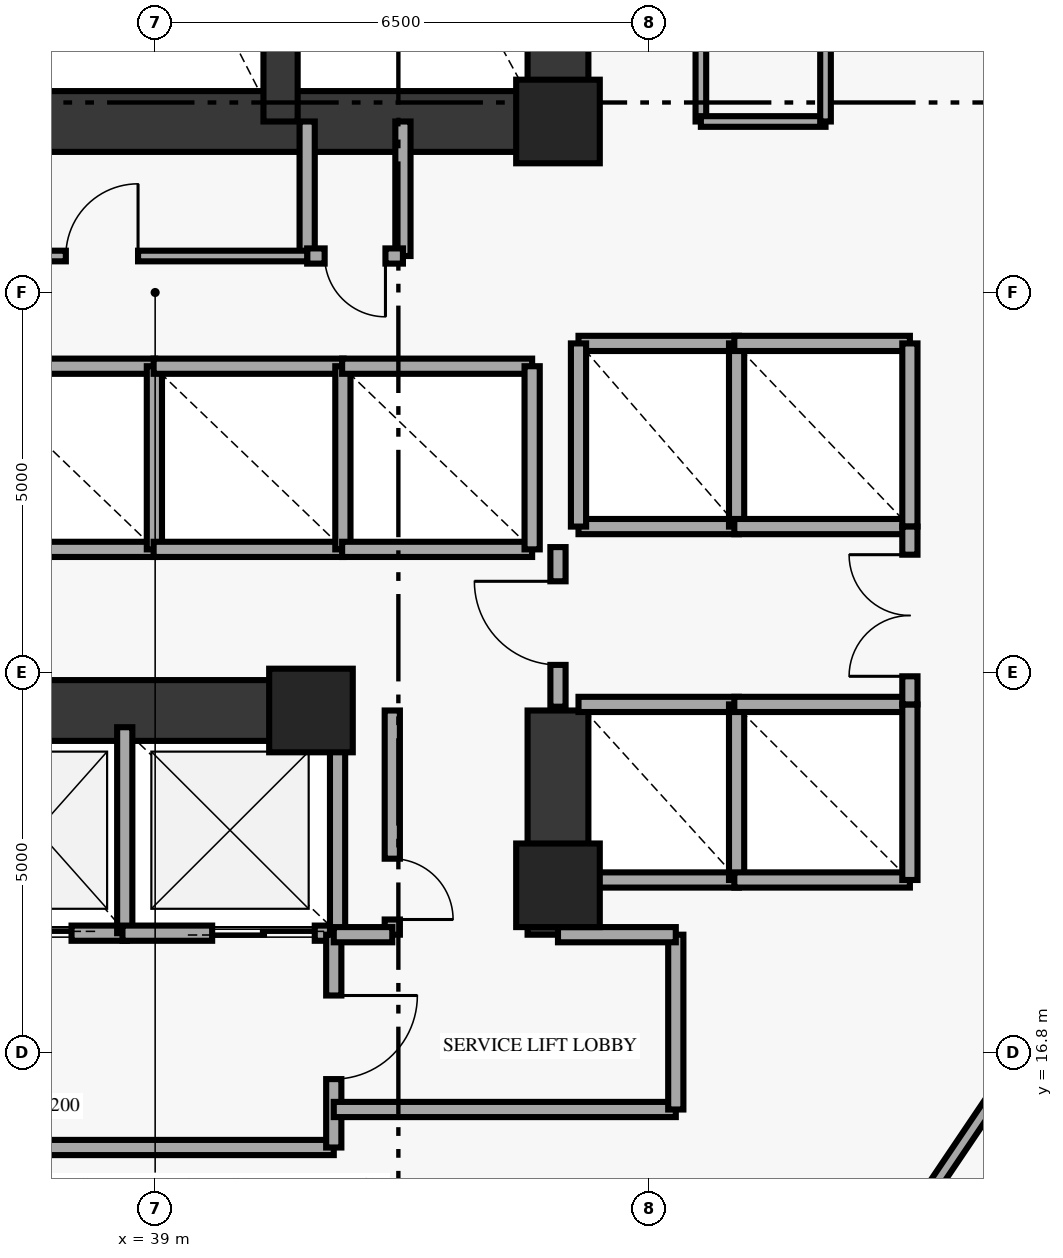
"""IFC4 building model, lengths in metres.
Left out: names, types, materials, properties, quantities, classifications, styles, units other than length and angle.
Written with IfcOpenShell. Run it as: python <this file> out.ifc"""

import sys

from ifc_helpers import new_model, si_unit, direction, frame, frame_2d, origin, origin_2d, place, context, subcontext, project, spatial, rectangle, extrude, element, fill, save


model = new_model("IFC4")
c1 = context("Model", 3, precision=1e-05, world=origin(), true_north=direction((0.0, 1.0)))
c2 = subcontext(c1, "Body", "Model", "MODEL_VIEW")
j1 = project(units=[si_unit("LENGTHUNIT", "METRE"), si_unit("PLANEANGLEUNIT", "RADIAN")], contexts=[c1])
p1 = place(None, origin())
s1 = spatial("IfcSite", under=j1, at=p1, CompositionType="ELEMENT")
p2 = place(p1, origin())
s2 = spatial("IfcBuilding", under=s1, at=p2, CompositionType="ELEMENT")
p3 = place(p2, frame((0.0, 0.0, 53.4)))
s3 = spatial("IfcBuildingStorey", under=s2, at=p3, CompositionType="ELEMENT", Elevation=53.4)
for number, where, z_axis, x_axis in (
    (1, (41.05, 21.3, 0.0), (0.0, 0.0, 1.0), (1.0, 0.0, 0.0)),
    (2, (44.3, 19.0, 0.0), (0.0, 0.0, 1.0), (1.0, 0.0, 0.0)),
    (3, (44.3, 29.05, 0.0), (0.0, 0.0, 1.0), (1.0, 0.0, 0.0)),
):
    element("IfcColumn", number, at=place(p3, frame(where, z_axis=z_axis, x_axis=x_axis)), inside=s3, PredefinedType="PILASTER", context=c2, shape_type="SweptSolid", body=[
        extrude(rectangle(XDim=1.1, YDim=1.1, at=origin_2d()), origin(), (0.0, 0.0, 1.0), 3.8),
    ])
p4 = place(p3, frame((44.3, 29.05, 0.0), z_axis=(0.0, 0.0, 1.0), x_axis=(0.0, 1.0, 0.0)))
e4 = element("IfcWall", 4, at=p4, inside=s3, PredefinedType="SHEAR", context=c2, shape_type="SweptSolid", body=[
    extrude(rectangle(XDim=8.35, YDim=0.8, at=frame_2d((4.175, 0.0))), origin(), (0.0, 0.0, 1.0), 3.8),
])
p5 = place(p3, frame((44.3, 18.35, 0.0), z_axis=(0.0, 0.0, 1.0), x_axis=(0.0, 1.0, 0.0)))
e5 = element("IfcWall", 5, at=p5, inside=s3, PredefinedType="SHEAR", context=c2, shape_type="SweptSolid", body=[
    extrude(rectangle(XDim=2.95, YDim=0.8, at=frame_2d((1.475, 0.0))), origin(), (0.0, 0.0, 1.0), 3.8),
])
p6 = place(p3, frame((33.7, 29.05, 0.0), z_axis=(0.0, 0.0, 1.0), x_axis=(1.0, 0.0, 0.0)))
e6 = element("IfcWall", 6, at=p6, inside=s3, PredefinedType="SHEAR", context=c2, shape_type="SweptSolid", body=[
    extrude(rectangle(XDim=10.6, YDim=0.8, at=frame_2d((5.3, 0.0))), origin(), (0.0, 0.0, 1.0), 3.8),
])
p7 = place(p3, frame((33.7, 21.3, 0.0), z_axis=(0.0, 0.0, 1.0), x_axis=(1.0, 0.0, 0.0)))
e7 = element("IfcWall", 7, at=p7, inside=s3, PredefinedType="SHEAR", context=c2, shape_type="SweptSolid", body=[
    extrude(rectangle(XDim=7.55, YDim=0.8, at=frame_2d((3.775, 0.0))), origin(), (0.0, 0.0, 1.0), 3.8),
])
p8 = place(p3, frame((40.65, 29.05, 0.0), z_axis=(0.0, 0.0, 1.0), x_axis=(0.0, 1.0, 0.0)))
e8 = element("IfcWall", 8, at=p8, inside=s3, PredefinedType="SHEAR", context=c2, shape_type="SweptSolid", body=[
    extrude(rectangle(XDim=8.35, YDim=0.45, at=frame_2d((4.175, 0.0))), origin(), (0.0, 0.0, 1.0), 3.8),
])
for number, where, z_axis, x_axis in (
    (9, (41.0, 27.28, 0.0), (0.0, 0.0, 1.0), (0.0, 1.0, 0.0)),
    (10, (42.26, 27.28, 0.0), (0.0, 0.0, 1.0), (0.0, 1.0, 0.0)),
):
    element("IfcWall", number, at=place(p3, frame(where, z_axis=z_axis, x_axis=x_axis)), inside=s3, PredefinedType="SOLIDWALL", context=c2, shape_type="SweptSolid", body=[
        extrude(rectangle(XDim=1.77, YDim=0.2, at=frame_2d((0.885, 0.0))), origin(), (0.0, 0.0, 1.0), 3.8),
    ])
p9 = place(p3, frame((41.0, 27.28, 0.0), z_axis=(0.0, 0.0, 1.0), x_axis=(1.0, 0.0, 0.0)))
e11 = element("IfcWall", 11, at=p9, inside=s3, PredefinedType="SOLIDWALL", context=c2, shape_type="SweptSolid", body=[
    extrude(rectangle(XDim=1.26, YDim=0.2, at=frame_2d((0.63, 0.0))), origin(), (0.0, 0.0, 1.0), 3.8),
])
p10 = place(p9, frame((0.23, 0.0, 0.0)))
e12 = element("IfcOpeningElement", 12, at=p10, cuts=e11, PredefinedType="OPENING", context=c2, shape_type="SweptSolid", body=[
    extrude(rectangle(XDim=0.8, YDim=2.05, at=frame_2d((0.4, 1.025))), frame((0.0, 0.11, 0.0), z_axis=(0.0, -1.0, 0.0), x_axis=(1.0, 0.0, 0.0)), (0.0, 0.0, 1.0), 0.22),
])
for number, where, z_axis, x_axis in (
    (13, (44.57, 23.72, 0.0), (0.0, 0.0, 1.0), (1.0, 0.0, 0.0)),
    (14, (44.57, 26.13, 0.0), (0.0, 0.0, 1.0), (1.0, 0.0, 0.0)),
):
    element("IfcWall", number, at=place(p3, frame(where, z_axis=z_axis, x_axis=x_axis)), inside=s3, PredefinedType="SOLIDWALL", context=c2, shape_type="SweptSolid", body=[
        extrude(rectangle(XDim=2.11, YDim=0.2, at=frame_2d((1.055, 0.0))), origin(), (0.0, 0.0, 1.0), 3.8),
    ])
for number, where, z_axis, x_axis in (
    (15, (44.57, 23.72, 0.0), (0.0, 0.0, 1.0), (0.0, 1.0, 0.0)),
    (16, (46.65, 23.72, 0.0), (0.0, 0.0, 1.0), (0.0, 1.0, 0.0)),
):
    element("IfcWall", number, at=place(p3, frame(where, z_axis=z_axis, x_axis=x_axis)), inside=s3, PredefinedType="SOLIDWALL", context=c2, shape_type="SweptSolid", body=[
        extrude(rectangle(XDim=2.41, YDim=0.2, at=frame_2d((1.205, 0.0))), origin(), (0.0, 0.0, 1.0), 3.8),
    ])
for number, where, z_axis, x_axis in (
    (17, (46.62, 23.72, 0.0), (0.0, 0.0, 1.0), (1.0, 0.0, 0.0)),
    (18, (46.62, 26.13, 0.0), (0.0, 0.0, 1.0), (1.0, 0.0, 0.0)),
):
    element("IfcWall", number, at=place(p3, frame(where, z_axis=z_axis, x_axis=x_axis)), inside=s3, PredefinedType="SOLIDWALL", context=c2, shape_type="SweptSolid", body=[
        extrude(rectangle(XDim=2.31, YDim=0.2, at=frame_2d((1.155, 0.0))), origin(), (0.0, 0.0, 1.0), 3.8),
    ])
p11 = place(p3, frame((48.93, 23.72, 0.0), z_axis=(0.0, 0.0, 1.0), x_axis=(0.0, 1.0, 0.0)))
e19 = element("IfcWall", 19, at=p11, inside=s3, PredefinedType="SOLIDWALL", context=c2, shape_type="SweptSolid", body=[
    extrude(rectangle(XDim=2.41, YDim=0.2, at=frame_2d((1.205, 0.0))), origin(), (0.0, 0.0, 1.0), 3.8),
])
for number, where, z_axis, x_axis in (
    (20, (44.57, 19.07, 0.0), (0.0, 0.0, 1.0), (1.0, 0.0, 0.0)),
    (21, (44.57, 21.38, 0.0), (0.0, 0.0, 1.0), (1.0, 0.0, 0.0)),
):
    element("IfcWall", number, at=place(p3, frame(where, z_axis=z_axis, x_axis=x_axis)), inside=s3, PredefinedType="SOLIDWALL", context=c2, shape_type="SweptSolid", body=[
        extrude(rectangle(XDim=2.11, YDim=0.2, at=frame_2d((1.055, 0.0))), origin(), (0.0, 0.0, 1.0), 3.8),
    ])
for number, where, z_axis, x_axis in (
    (22, (46.65, 19.07, 0.0), (0.0, 0.0, 1.0), (0.0, 1.0, 0.0)),
    (23, (46.62, 19.07, 0.0), (0.0, 0.0, 1.0), (1.0, 0.0, 0.0)),
    (24, (46.62, 21.38, 0.0), (0.0, 0.0, 1.0), (1.0, 0.0, 0.0)),
    (25, (48.93, 19.07, 0.0), (0.0, 0.0, 1.0), (0.0, 1.0, 0.0)),
):
    element("IfcWall", number, at=place(p3, frame(where, z_axis=z_axis, x_axis=x_axis)), inside=s3, PredefinedType="SOLIDWALL", context=c2, shape_type="SweptSolid", body=[
        extrude(rectangle(XDim=2.31, YDim=0.2, at=frame_2d((1.155, 0.0))), origin(), (0.0, 0.0, 1.0), 3.8),
    ])
for number, where, z_axis, x_axis in (
    (26, (36.5, 23.42, 0.0), (0.0, 0.0, 1.0), (1.0, 0.0, 0.0)),
    (27, (36.5, 25.83, 0.0), (0.0, 0.0, 1.0), (1.0, 0.0, 0.0)),
):
    element("IfcWall", number, at=place(p3, frame(where, z_axis=z_axis, x_axis=x_axis)), inside=s3, PredefinedType="SOLIDWALL", context=c2, shape_type="SweptSolid", body=[
        extrude(rectangle(XDim=2.5, YDim=0.2, at=frame_2d((1.25, 0.0))), origin(), (0.0, 0.0, 1.0), 3.8),
    ])
p12 = place(p3, frame((38.99, 23.42, 0.0), z_axis=(0.0, 0.0, 1.0), x_axis=(0.0, 1.0, 0.0)))
e28 = element("IfcWall", 28, at=p12, inside=s3, PredefinedType="SOLIDWALL", context=c2, shape_type="SweptSolid", body=[
    extrude(rectangle(XDim=2.41, YDim=0.2, at=frame_2d((1.205, 0.0))), origin(), (0.0, 0.0, 1.0), 3.8),
])
for number, where, z_axis, x_axis in (
    (29, (38.98, 23.42, 0.0), (0.0, 0.0, 1.0), (1.0, 0.0, 0.0)),
    (30, (38.98, 25.83, 0.0), (0.0, 0.0, 1.0), (1.0, 0.0, 0.0)),
):
    element("IfcWall", number, at=place(p3, frame(where, z_axis=z_axis, x_axis=x_axis)), inside=s3, PredefinedType="SOLIDWALL", context=c2, shape_type="SweptSolid", body=[
        extrude(rectangle(XDim=2.5, YDim=0.2, at=frame_2d((1.25, 0.0))), origin(), (0.0, 0.0, 1.0), 3.8),
    ])
p13 = place(p3, frame((41.47, 23.42, 0.0), z_axis=(0.0, 0.0, 1.0), x_axis=(0.0, 1.0, 0.0)))
e31 = element("IfcWall", 31, at=p13, inside=s3, PredefinedType="SOLIDWALL", context=c2, shape_type="SweptSolid", body=[
    extrude(rectangle(XDim=2.41, YDim=0.2, at=frame_2d((1.205, 0.0))), origin(), (0.0, 0.0, 1.0), 3.8),
])
for number, where, z_axis, x_axis in (
    (32, (41.46, 23.42, 0.0), (0.0, 0.0, 1.0), (1.0, 0.0, 0.0)),
    (33, (41.46, 25.83, 0.0), (0.0, 0.0, 1.0), (1.0, 0.0, 0.0)),
):
    element("IfcWall", number, at=place(p3, frame(where, z_axis=z_axis, x_axis=x_axis)), inside=s3, PredefinedType="SOLIDWALL", context=c2, shape_type="SweptSolid", body=[
        extrude(rectangle(XDim=2.5, YDim=0.2, at=frame_2d((1.25, 0.0))), origin(), (0.0, 0.0, 1.0), 3.8),
    ])
p14 = place(p3, frame((43.96, 23.42, 0.0), z_axis=(0.0, 0.0, 1.0), x_axis=(0.0, 1.0, 0.0)))
e34 = element("IfcWall", 34, at=p14, inside=s3, PredefinedType="SOLIDWALL", context=c2, shape_type="SweptSolid", body=[
    extrude(rectangle(XDim=2.41, YDim=0.2, at=frame_2d((1.205, 0.0))), origin(), (0.0, 0.0, 1.0), 3.8),
])
p15 = place(p3, frame((36.27, 18.37, 0.0), z_axis=(0.0, 0.0, 1.0), x_axis=(1.0, 0.0, 0.0)))
e35 = element("IfcWall", 35, at=p15, inside=s3, PredefinedType="SOLIDWALL", context=c2, shape_type="SweptSolid", body=[
    extrude(rectangle(XDim=2.36, YDim=0.2, at=frame_2d((1.18, 0.0))), origin(), (0.0, 0.0, 1.0), 3.8),
])
p16 = place(p15, frame((0.38, 0.0, 0.0)))
e36 = element("IfcOpeningElement", 36, at=p16, cuts=e35, PredefinedType="OPENING", context=c2, shape_type="SweptSolid", body=[
    extrude(rectangle(XDim=1.25, YDim=2.2, at=frame_2d((0.625, 1.1))), frame((0.0, 0.11, 0.0), z_axis=(0.0, -1.0, 0.0), x_axis=(1.0, 0.0, 0.0)), (0.0, 0.0, 1.0), 0.22),
])
p17 = place(p3, frame((38.6, 18.37, 0.0), z_axis=(0.0, 0.0, 1.0), x_axis=(0.0, 1.0, 0.0)))
e37 = element("IfcWall", 37, at=p17, inside=s3, PredefinedType="SOLIDWALL", context=c2, shape_type="SweptSolid", body=[
    extrude(rectangle(XDim=2.71, YDim=0.2, at=frame_2d((1.355, 0.0))), origin(), (0.0, 0.0, 1.0), 3.8),
])
p18 = place(p3, frame((38.57, 18.37, 0.0), z_axis=(0.0, 0.0, 1.0), x_axis=(1.0, 0.0, 0.0)))
e38 = element("IfcWall", 38, at=p18, inside=s3, PredefinedType="SOLIDWALL", context=c2, shape_type="SweptSolid", body=[
    extrude(rectangle(XDim=2.83, YDim=0.2, at=frame_2d((1.415, 0.0))), origin(), (0.0, 0.0, 1.0), 3.8),
])
p19 = place(p18, frame((1.18, 0.0, 0.0)))
e39 = element("IfcOpeningElement", 39, at=p19, cuts=e38, PredefinedType="OPENING", context=c2, shape_type="SweptSolid", body=[
    extrude(rectangle(XDim=1.35, YDim=2.18, at=frame_2d((0.675, 1.09))), frame((0.0, 0.11, 0.0), z_axis=(0.0, -1.0, 0.0), x_axis=(1.0, 0.0, 0.0)), (0.0, 0.0, 1.0), 0.22),
])
p20 = place(p3, frame((41.4, 18.37, 0.0), z_axis=(0.0, 0.0, 1.0), x_axis=(0.0, 1.0, 0.0)))
e40 = element("IfcWall", 40, at=p20, inside=s3, PredefinedType="SOLIDWALL", context=c2, shape_type="SweptSolid", body=[
    extrude(rectangle(XDim=2.71, YDim=0.2, at=frame_2d((1.355, 0.0))), origin(), (0.0, 0.0, 1.0), 3.8),
])
p21 = place(p3, frame((48.93, 21.38, 0.0), z_axis=(0.0, 0.0, 1.0), x_axis=(0.0, 1.0, 0.0)))
e41 = element("IfcWall", 41, at=p21, inside=s3, PredefinedType="SOLIDWALL", context=c2, shape_type="SweptSolid", body=[
    extrude(rectangle(XDim=2.34, YDim=0.2, at=frame_2d((1.17, 0.0))), origin(), (0.0, 0.0, 1.0), 3.8),
])
p22 = place(p21, frame((0.37, 0.0, 0.0)))
e42 = element("IfcOpeningElement", 42, at=p22, cuts=e41, PredefinedType="OPENING", context=c2, shape_type="SweptSolid", body=[
    extrude(rectangle(XDim=1.6, YDim=2.2, at=frame_2d((0.8, 1.1))), frame((0.0, 0.11, 0.0), z_axis=(0.0, -1.0, 0.0), x_axis=(1.0, 0.0, 0.0)), (0.0, 0.0, 1.0), 0.22),
])
p23 = place(p3, frame((44.3, 21.35, 0.0), z_axis=(0.0, 0.0, 1.0), x_axis=(0.0, 1.0, 0.0)))
e43 = element("IfcWall", 43, at=p23, inside=s3, PredefinedType="SOLIDWALL", context=c2, shape_type="SweptSolid", body=[
    extrude(rectangle(XDim=2.1, YDim=0.2, at=frame_2d((1.05, 0.0))), origin(), (0.0, 0.0, 1.0), 3.02),
])
p24 = place(p23, frame((0.55, 0.0, 0.0)))
e44 = element("IfcOpeningElement", 44, at=p24, cuts=e43, PredefinedType="OPENING", context=c2, shape_type="SweptSolid", body=[
    extrude(rectangle(XDim=1.1, YDim=2.15, at=frame_2d((0.55, 1.075))), frame((0.0, 0.11, 0.0), z_axis=(0.0, -1.0, 0.0), x_axis=(1.0, 0.0, 0.0)), (0.0, 0.0, 1.0), 0.22),
])
p25 = place(p3, frame((33.8, 15.55, 0.0), z_axis=(0.0, 0.0, 1.0), x_axis=(1.0, 0.0, 0.0)))
e45 = element("IfcWall", 45, at=p25, inside=s3, PredefinedType="SOLIDWALL", context=c2, shape_type="SweptSolid", body=[
    extrude(rectangle(XDim=7.55, YDim=0.2, at=frame_2d((3.775, 0.0))), origin(), (0.0, 0.0, 1.0), 3.8),
])
p26 = place(p3, frame((41.35, 15.55, 0.0), z_axis=(0.0, 0.0, 1.0), x_axis=(0.0, 1.0, 0.0)))
e46 = element("IfcWall", 46, at=p26, inside=s3, PredefinedType="SOLIDWALL", context=c2, shape_type="SweptSolid", body=[
    extrude(rectangle(XDim=2.8, YDim=0.2, at=frame_2d((1.4, 0.0))), origin(), (0.0, 0.0, 1.0), 3.8),
])
p27 = place(p26, frame((0.9, 0.0, 0.0)))
e47 = element("IfcOpeningElement", 47, at=p27, cuts=e46, PredefinedType="OPENING", context=c2, shape_type="SweptSolid", body=[
    extrude(rectangle(XDim=1.1, YDim=2.15, at=frame_2d((0.55, 1.075))), frame((0.0, 0.11, 0.0), z_axis=(0.0, -1.0, 0.0), x_axis=(1.0, 0.0, 0.0)), (0.0, 0.0, 1.0), 0.22),
])
p28 = place(p3, frame((41.35, 16.05, 0.0), z_axis=(0.0, 0.0, 1.0), x_axis=(1.0, 0.0, 0.0)))
e48 = element("IfcWall", 48, at=p28, inside=s3, PredefinedType="SOLIDWALL", context=c2, shape_type="SweptSolid", body=[
    extrude(rectangle(XDim=4.5, YDim=0.2, at=frame_2d((2.25, 0.0))), origin(), (0.0, 0.0, 1.0), 3.8),
])
p29 = place(p3, frame((45.85, 16.05, 0.0), z_axis=(0.0, 0.0, 1.0), x_axis=(0.0, 1.0, 0.0)))
e49 = element("IfcWall", 49, at=p29, inside=s3, PredefinedType="SOLIDWALL", context=c2, shape_type="SweptSolid", body=[
    extrude(rectangle(XDim=2.3, YDim=0.2, at=frame_2d((1.15, 0.0))), origin(), (0.0, 0.0, 1.0), 3.8),
])
p30 = place(p3, frame((44.3, 18.35, 0.0), z_axis=(0.0, 0.0, 1.0), x_axis=(1.0, 0.0, 0.0)))
e50 = element("IfcWall", 50, at=p30, inside=s3, PredefinedType="SOLIDWALL", context=c2, shape_type="SweptSolid", body=[
    extrude(rectangle(XDim=1.55, YDim=0.2, at=frame_2d((0.775, 0.0))), origin(), (0.0, 0.0, 1.0), 3.8),
])
p31 = place(p3, frame((42.12, 18.35, 0.0), z_axis=(0.0, 0.0, 1.0), x_axis=(0.0, 1.0, 0.0)))
e51 = element("IfcWall", 51, at=p31, inside=s3, PredefinedType="SOLIDWALL", context=c2, shape_type="SweptSolid", body=[
    extrude(rectangle(XDim=2.95, YDim=0.2, at=frame_2d((1.475, 0.0))), origin(), (0.0, 0.0, 1.0), 3.8),
])
p32 = place(p31, frame((0.2, 0.0, 0.0)))
e52 = element("IfcOpeningElement", 52, at=p32, cuts=e51, PredefinedType="OPENING", context=c2, shape_type="SweptSolid", body=[
    extrude(rectangle(XDim=0.8, YDim=2.05, at=frame_2d((0.4, 1.025))), frame((0.0, 0.11, 0.0), z_axis=(0.0, -1.0, 0.0), x_axis=(1.0, 0.0, 0.0)), (0.0, 0.0, 1.0), 0.22),
])
p33 = place(p3, frame((41.35, 18.35, 0.0), z_axis=(0.0, 0.0, 1.0), x_axis=(1.0, 0.0, 0.0)))
e53 = element("IfcWall", 53, at=p33, inside=s3, PredefinedType="SOLIDWALL", context=c2, shape_type="SweptSolid", body=[
    extrude(rectangle(XDim=0.77, YDim=0.2, at=frame_2d((0.385, 0.0))), origin(), (0.0, 0.0, 1.0), 3.8),
])
p34 = place(p3, frame((35.6, 27.28, 0.0), z_axis=(0.0, 0.0, 1.0), x_axis=(1.0, 0.0, 0.0)))
e54 = element("IfcWall", 54, at=p34, inside=s3, PredefinedType="PARTITIONING", context=c2, shape_type="SweptSolid", body=[
    extrude(rectangle(XDim=5.4, YDim=0.14, at=frame_2d((2.7, 0.0))), origin(), (0.0, 0.0, 1.0), 3.8),
])
p35 = place(p34, frame((2.225, 0.0, 0.0)))
e55 = element("IfcOpeningElement", 55, at=p35, cuts=e54, PredefinedType="OPENING", context=c2, shape_type="SweptSolid", body=[
    extrude(rectangle(XDim=0.95, YDim=2.1, at=frame_2d((0.475, 1.05))), frame((0.0, 0.08, 0.0), z_axis=(0.0, -1.0, 0.0), x_axis=(1.0, 0.0, 0.0)), (0.0, 0.0, 1.0), 0.16),
])
p36 = place(p3, frame((46.18, 34.05, 0.0), z_axis=(0.0, 0.0, 1.0), x_axis=(0.0, -1.0, 0.0)))
e56 = element("IfcWall", 56, at=p36, inside=s3, PredefinedType="PARTITIONING", context=c2, shape_type="SweptSolid", body=[
    extrude(rectangle(XDim=5.0, YDim=0.14, at=frame_2d((2.5, 0.0))), origin(), (0.0, 0.0, 1.0), 3.8),
])
p37 = place(p36, frame((2.1, 0.0, 0.0)))
e57 = element("IfcOpeningElement", 57, at=p37, cuts=e56, PredefinedType="OPENING", context=c2, shape_type="SweptSolid", body=[
    extrude(rectangle(XDim=0.8, YDim=2.05, at=frame_2d((0.4, 1.025))), frame((0.0, 0.08, 0.0), z_axis=(0.0, -1.0, 0.0), x_axis=(1.0, 0.0, 0.0)), (0.0, 0.0, 1.0), 0.16),
])
p38 = place(p3, frame((46.18, 29.05, 0.0), z_axis=(0.0, 0.0, 1.0), x_axis=(1.0, 0.0, 0.0)))
e58 = element("IfcWall", 58, at=p38, inside=s3, PredefinedType="PARTITIONING", context=c2, shape_type="SweptSolid", body=[
    extrude(rectangle(XDim=1.64, YDim=0.14, at=frame_2d((0.82, 0.0))), origin(), (0.0, 0.0, 1.0), 3.8),
])
p39 = place(p3, frame((47.82, 29.05, 0.0), z_axis=(0.0, 0.0, 1.0), x_axis=(0.0, 1.0, 0.0)))
e59 = element("IfcWall", 59, at=p39, inside=s3, PredefinedType="PARTITIONING", context=c2, shape_type="SweptSolid", body=[
    extrude(rectangle(XDim=5.0, YDim=0.14, at=frame_2d((2.5, 0.0))), origin(), (0.0, 0.0, 1.0), 3.8),
])
p40 = place(p3, frame((51.522, 18.414, 0.0), z_axis=(0.0, 0.0, 1.0), x_axis=(-0.559181123292, -0.829045518264, 0.0)))
e60 = element("IfcWall", 60, at=p40, inside=s3, PredefinedType="PARTITIONING", context=c2, shape_type="SweptSolid", body=[
    extrude(rectangle(XDim=4.154, YDim=0.16, at=frame_2d((2.077, 0.0))), origin(), (0.0, 0.0, 1.0), 3.8),
])
p41 = place(p40, frame((1.602, 0.0, 0.0)))
e61 = element("IfcOpeningElement", 61, at=p41, cuts=e60, PredefinedType="OPENING", context=c2, shape_type="SweptSolid", body=[
    extrude(rectangle(XDim=0.95, YDim=2.15, at=frame_2d((0.475, 1.075))), frame((0.0, 0.09, 0.0), z_axis=(0.0, -1.0, 0.0), x_axis=(1.0, 0.0, 0.0)), (0.0, 0.0, 1.0), 0.18),
])
p42 = place(p10, origin())
e62 = element("IfcDoor", 62, at=p42, inside=s3, OperationType="SINGLE_SWING_RIGHT", PredefinedType="DOOR", context=c2, shape_type="SweptSolid", body=[
    extrude(rectangle(XDim=0.8, YDim=2.05, at=frame_2d((0.4, 1.025))), frame((0.0, 0.025, 0.0), z_axis=(0.0, -1.0, 0.0), x_axis=(1.0, 0.0, 0.0)), (0.0, 0.0, 1.0), 0.05),
])
fill(e12, e62)
p43 = place(p16, origin())
e63 = element("IfcDoor", 63, at=p43, inside=s3, OperationType="DOUBLE_DOOR_SLIDING", PredefinedType="DOOR", context=c2, shape_type="SweptSolid", body=[
    extrude(rectangle(XDim=1.25, YDim=2.2, at=frame_2d((0.625, 1.1))), frame((0.0, 0.025, 0.0), z_axis=(0.0, -1.0, 0.0), x_axis=(1.0, 0.0, 0.0)), (0.0, 0.0, 1.0), 0.05),
])
fill(e36, e63)
p44 = place(p19, origin())
e64 = element("IfcDoor", 64, at=p44, inside=s3, OperationType="DOUBLE_DOOR_SLIDING", PredefinedType="DOOR", context=c2, shape_type="SweptSolid", body=[
    extrude(rectangle(XDim=1.35, YDim=2.18, at=frame_2d((0.675, 1.09))), frame((0.0, 0.025, 0.0), z_axis=(0.0, -1.0, 0.0), x_axis=(1.0, 0.0, 0.0)), (0.0, 0.0, 1.0), 0.05),
])
fill(e39, e64)
p45 = place(p22, origin())
e65 = element("IfcDoor", 65, at=p45, inside=s3, OperationType="DOUBLE_DOOR_SINGLE_SWING", PredefinedType="DOOR", context=c2, shape_type="SweptSolid", body=[
    extrude(rectangle(XDim=1.6, YDim=2.2, at=frame_2d((0.8, 1.1))), frame((0.0, 0.025, 0.0), z_axis=(0.0, -1.0, 0.0), x_axis=(1.0, 0.0, 0.0)), (0.0, 0.0, 1.0), 0.05),
])
fill(e42, e65)
p46 = place(p24, origin())
e66 = element("IfcDoor", 66, at=p46, inside=s3, OperationType="SINGLE_SWING_RIGHT", PredefinedType="DOOR", context=c2, shape_type="SweptSolid", body=[
    extrude(rectangle(XDim=1.1, YDim=2.15, at=frame_2d((0.55, 1.075))), frame((0.0, 0.025, 0.0), z_axis=(0.0, -1.0, 0.0), x_axis=(1.0, 0.0, 0.0)), (0.0, 0.0, 1.0), 0.05),
])
fill(e44, e66)
p47 = place(p27, origin())
e67 = element("IfcDoor", 67, at=p47, inside=s3, OperationType="SINGLE_SWING_RIGHT", PredefinedType="DOOR", context=c2, shape_type="SweptSolid", body=[
    extrude(rectangle(XDim=1.1, YDim=2.15, at=frame_2d((0.55, 1.075))), frame((0.0, 0.025, 0.0), z_axis=(0.0, -1.0, 0.0), x_axis=(1.0, 0.0, 0.0)), (0.0, 0.0, 1.0), 0.05),
])
fill(e47, e67)
p48 = place(p32, origin())
e68 = element("IfcDoor", 68, at=p48, inside=s3, OperationType="SINGLE_SWING_LEFT", PredefinedType="DOOR", context=c2, shape_type="SweptSolid", body=[
    extrude(rectangle(XDim=0.8, YDim=2.05, at=frame_2d((0.4, 1.025))), frame((0.0, 0.025, 0.0), z_axis=(0.0, -1.0, 0.0), x_axis=(1.0, 0.0, 0.0)), (0.0, 0.0, 1.0), 0.05),
])
fill(e52, e68)
p49 = place(p35, origin())
e69 = element("IfcDoor", 69, at=p49, inside=s3, OperationType="SINGLE_SWING_RIGHT", PredefinedType="DOOR", context=c2, shape_type="SweptSolid", body=[
    extrude(rectangle(XDim=0.95, YDim=2.1, at=frame_2d((0.475, 1.05))), frame((0.0, 0.025, 0.0), z_axis=(0.0, -1.0, 0.0), x_axis=(1.0, 0.0, 0.0)), (0.0, 0.0, 1.0), 0.05),
])
fill(e55, e69)
save(model, sys.argv[1])
